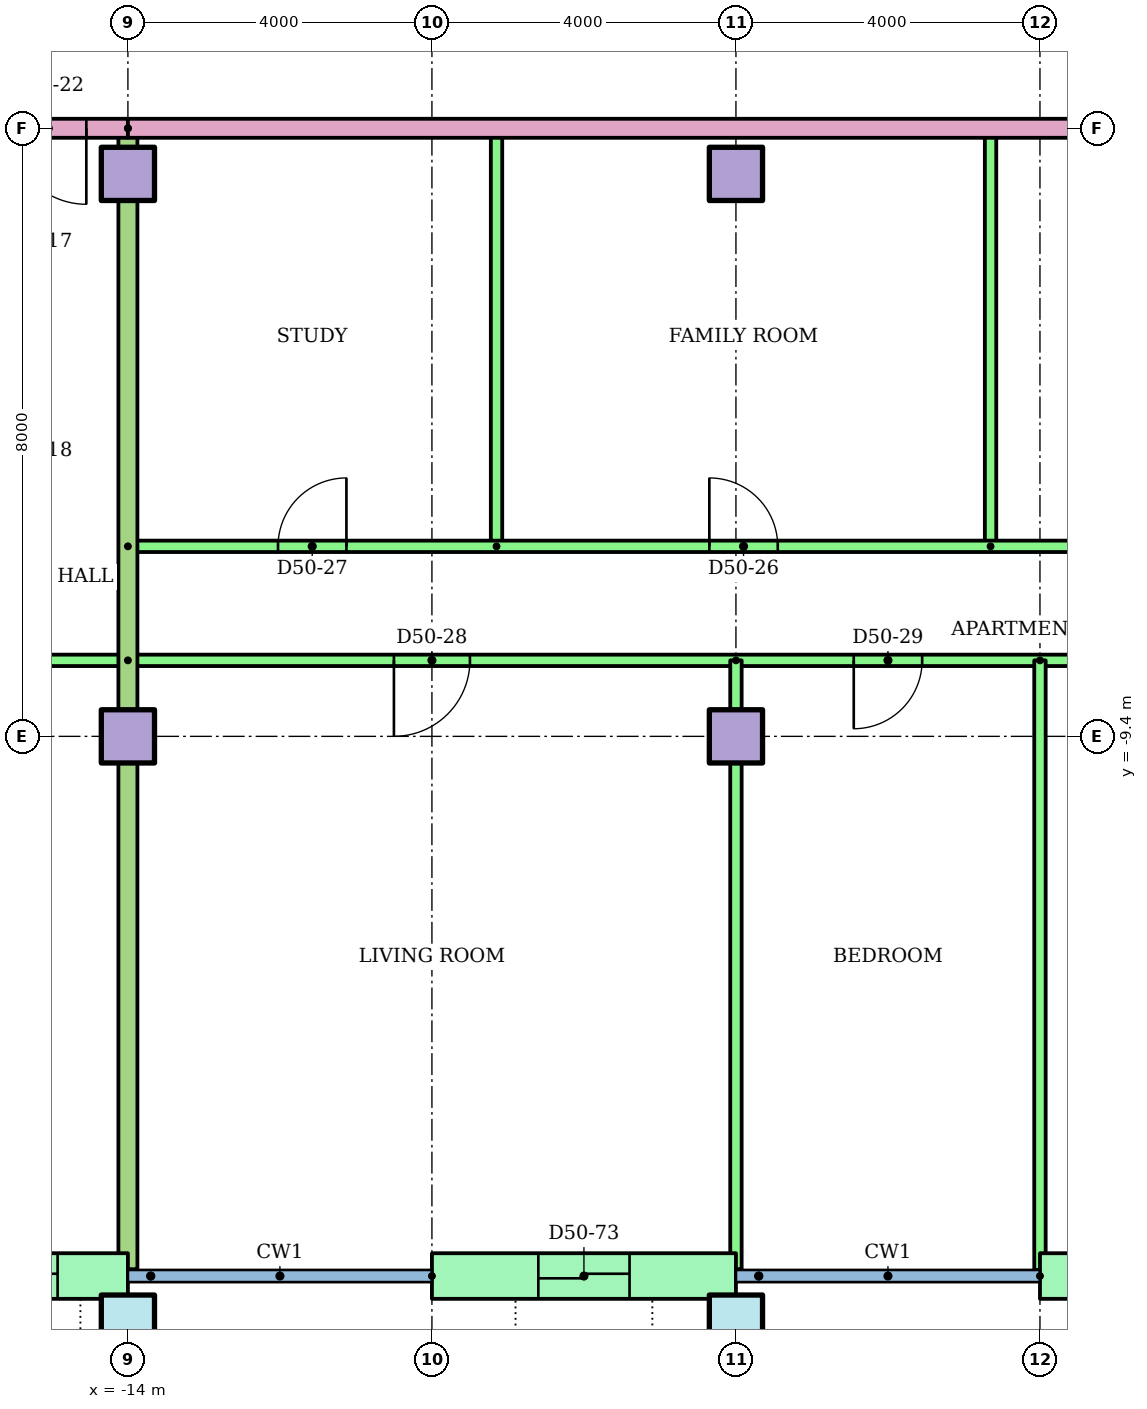
"""IFC4 building model, lengths in metres.
Left out: names, types, materials, properties, quantities, classifications, styles, units other than length and angle.
Written with IfcOpenShell. Run it as: python <this file> out.ifc"""

import sys

from ifc_helpers import new_model, si_unit, direction, frame, frame_2d, origin, origin_2d, place, context, subcontext, project, spatial, rectangle, hollow_rectangle, extrude, element, fill, save


model = new_model("IFC4")
c1 = context("Model", 3, precision=1e-05, world=origin(), true_north=direction((0.0, 1.0)))
c2 = subcontext(c1, "Body", "Model", "MODEL_VIEW")
j1 = project(units=[si_unit("LENGTHUNIT", "METRE"), si_unit("PLANEANGLEUNIT", "RADIAN")], contexts=[c1])
p1 = place(None, origin())
s1 = spatial("IfcSite", under=j1, at=p1, CompositionType="ELEMENT")
p2 = place(p1, origin())
s2 = spatial("IfcBuilding", under=s1, at=p2, CompositionType="ELEMENT")
p3 = place(p2, frame((0.0, 0.0, 190.9)))
s3 = spatial("IfcBuildingStorey", under=s2, at=p3, CompositionType="ELEMENT", Elevation=190.9)
for number, where in (
    (1, (-14.0, -17.1, 0.0)),
    (2, (-6.0, -17.1, 0.0)),
):
    element("IfcColumn", number, at=place(p3, frame(where)), inside=s3, PredefinedType="COLUMN", context=c2, shape_type="SweptSolid", body=[
        extrude(hollow_rectangle(XDim=0.7, YDim=0.7, WallThickness=0.036, at=origin_2d()), origin(), (0.0, 0.0, 1.0), 3.2),
    ])
for number, where in (
    (3, (-14.0, -9.4, 0.0)),
    (4, (-6.0, -9.4, 0.0)),
    (5, (-14.0, -2.0, 0.0)),
    (6, (-6.0, -2.0, 0.0)),
):
    element("IfcColumn", number, at=place(p3, frame(where)), inside=s3, PredefinedType="COLUMN", context=c2, shape_type="SweptSolid", body=[
        extrude(rectangle(XDim=0.7, YDim=0.7, at=origin_2d()), origin(), (0.0, 0.0, 1.0), 3.2),
    ])
p4 = place(p3, frame((-17.05, -16.5, 0.0)))
e7 = element("IfcWall", 7, at=p4, inside=s3, PredefinedType="STANDARD", context=c2, shape_type="SweptSolid", body=[
    extrude(rectangle(XDim=3.05, YDim=0.6, at=frame_2d((1.525, 0.0))), origin(), (0.0, 0.0, 1.0), 2.8),
])
p5 = place(p4, frame((0.925, 0.0, 0.0)))
e8 = element("IfcOpeningElement", 8, at=p5, cuts=e7, PredefinedType="OPENING", context=c2, shape_type="SweptSolid", body=[
    extrude(rectangle(XDim=1.2, YDim=2.1, at=frame_2d((0.6, 1.05))), frame((0.0, 0.31, 0.0), z_axis=(0.0, -1.0, 0.0), x_axis=(1.0, 0.0, 0.0)), (0.0, 0.0, 1.0), 0.62),
])
p6 = place(p3, frame((-10.0, -16.5, 0.0)))
e9 = element("IfcWall", 9, at=p6, inside=s3, PredefinedType="STANDARD", context=c2, shape_type="SweptSolid", body=[
    extrude(rectangle(XDim=4.0, YDim=0.6, at=frame_2d((2.0, 0.0))), origin(), (0.0, 0.0, 1.0), 2.8),
])
p7 = place(p6, frame((1.4, 0.0, 0.0)))
e10 = element("IfcOpeningElement", 10, at=p7, cuts=e9, PredefinedType="OPENING", context=c2, shape_type="SweptSolid", body=[
    extrude(rectangle(XDim=1.2, YDim=2.1, at=frame_2d((0.6, 1.05))), frame((0.0, 0.31, 0.0), z_axis=(0.0, -1.0, 0.0), x_axis=(1.0, 0.0, 0.0)), (0.0, 0.0, 1.0), 0.62),
])
p8 = place(p3, frame((-2.0, -16.5, 0.0)))
e11 = element("IfcWall", 11, at=p8, inside=s3, PredefinedType="STANDARD", context=c2, shape_type="SweptSolid", body=[
    extrude(rectangle(XDim=4.0, YDim=0.6, at=frame_2d((2.0, 0.0))), origin(), (0.0, 0.0, 1.0), 2.8),
])
p9 = place(p8, frame((1.4, 0.0, 0.0)))
e12 = element("IfcOpeningElement", 12, at=p9, cuts=e11, PredefinedType="OPENING", context=c2, shape_type="SweptSolid", body=[
    extrude(rectangle(XDim=1.2, YDim=2.1, at=frame_2d((0.6, 1.05))), frame((0.0, 0.31, 0.0), z_axis=(0.0, -1.0, 0.0), x_axis=(1.0, 0.0, 0.0)), (0.0, 0.0, 1.0), 0.62),
])
p10 = place(p3, frame((-14.0, -8.4, 0.0), z_axis=(0.0, 0.0, 1.0), x_axis=(-1.0, 0.0, 0.0)))
e13 = element("IfcWall", 13, at=p10, inside=s3, PredefinedType="PARTITIONING", context=c2, shape_type="SweptSolid", body=[
    extrude(rectangle(XDim=10.81, YDim=0.15, at=frame_2d((5.405, 0.0))), origin(), (0.0, 0.0, 1.0), 2.4),
])
p11 = place(p10, frame((8.547, 0.0, 0.0)))
e14 = element("IfcOpeningElement", 14, at=p11, cuts=e13, PredefinedType="OPENING", context=c2, shape_type="SweptSolid", body=[
    extrude(rectangle(XDim=0.9, YDim=2.1, at=frame_2d((0.45, 1.05))), frame((0.0, 0.085, 0.0), z_axis=(0.0, -1.0, 0.0), x_axis=(1.0, 0.0, 0.0)), (0.0, 0.0, 1.0), 0.17),
])
p12 = place(p10, frame((2.55, 0.0, 0.0)))
e15 = element("IfcOpeningElement", 15, at=p12, cuts=e13, PredefinedType="OPENING", context=c2, shape_type="SweptSolid", body=[
    extrude(rectangle(XDim=1.0, YDim=2.1, at=frame_2d((0.5, 1.05))), frame((0.0, 0.085, 0.0), z_axis=(0.0, -1.0, 0.0), x_axis=(1.0, 0.0, 0.0)), (0.0, 0.0, 1.0), 0.17),
])
for number, where, z_axis, x_axis in (
    (16, (-2.65, -6.9, 0.0), (0.0, 0.0, 1.0), (0.0, 1.0, 0.0)),
    (17, (-9.15, -6.9, 0.0), (0.0, 0.0, 1.0), (0.0, 1.0, 0.0)),
):
    element("IfcWall", number, at=place(p3, frame(where, z_axis=z_axis, x_axis=x_axis)), inside=s3, PredefinedType="PARTITIONING", context=c2, shape_type="SweptSolid", body=[
        extrude(rectangle(XDim=5.5, YDim=0.15, at=frame_2d((2.75, 0.0))), origin(), (0.0, 0.0, 1.0), 2.4),
    ])
p13 = place(p3, frame((-14.0, -6.9, 0.0)))
e18 = element("IfcWall", 18, at=p13, inside=s3, PredefinedType="PARTITIONING", context=c2, shape_type="SweptSolid", body=[
    extrude(rectangle(XDim=22.0, YDim=0.15, at=frame_2d((11.0, 0.0))), origin(), (0.0, 0.0, 1.0), 2.4),
])
p14 = place(p13, frame((15.025, 0.0, 0.0)))
e19 = element("IfcOpeningElement", 19, at=p14, cuts=e18, PredefinedType="OPENING", context=c2, shape_type="SweptSolid", body=[
    extrude(rectangle(XDim=0.9, YDim=2.1, at=frame_2d((0.45, 1.05))), frame((0.0, 0.085, 0.0), z_axis=(0.0, -1.0, 0.0), x_axis=(1.0, 0.0, 0.0)), (0.0, 0.0, 1.0), 0.17),
])
p15 = place(p13, frame((7.65, 0.0, 0.0)))
e20 = element("IfcOpeningElement", 20, at=p15, cuts=e18, PredefinedType="OPENING", context=c2, shape_type="SweptSolid", body=[
    extrude(rectangle(XDim=0.9, YDim=2.1, at=frame_2d((0.45, 1.05))), frame((0.0, 0.085, 0.0), z_axis=(0.0, -1.0, 0.0), x_axis=(1.0, 0.0, 0.0)), (0.0, 0.0, 1.0), 0.17),
])
p16 = place(p13, frame((1.975, 0.0, 0.0)))
e21 = element("IfcOpeningElement", 21, at=p16, cuts=e18, PredefinedType="OPENING", context=c2, shape_type="SweptSolid", body=[
    extrude(rectangle(XDim=0.9, YDim=2.1, at=frame_2d((0.45, 1.05))), frame((0.0, 0.085, 0.0), z_axis=(0.0, -1.0, 0.0), x_axis=(1.0, 0.0, 0.0)), (0.0, 0.0, 1.0), 0.17),
])
p17 = place(p3, frame((10.0, -8.4, 0.0), z_axis=(0.0, 0.0, 1.0), x_axis=(-1.0, 0.0, 0.0)))
e22 = element("IfcWall", 22, at=p17, inside=s3, PredefinedType="PARTITIONING", context=c2, shape_type="SweptSolid", body=[
    extrude(rectangle(XDim=24.0, YDim=0.15, at=frame_2d((12.0, 0.0))), origin(), (0.0, 0.0, 1.0), 2.4),
])
p18 = place(p17, frame((19.5, 0.0, 0.0)))
e23 = element("IfcOpeningElement", 23, at=p18, cuts=e22, PredefinedType="OPENING", context=c2, shape_type="SweptSolid", body=[
    extrude(rectangle(XDim=1.0, YDim=2.1, at=frame_2d((0.5, 1.05))), frame((0.0, 0.085, 0.0), z_axis=(0.0, -1.0, 0.0), x_axis=(1.0, 0.0, 0.0)), (0.0, 0.0, 1.0), 0.17),
])
p19 = place(p17, frame((13.55, 0.0, 0.0)))
e24 = element("IfcOpeningElement", 24, at=p19, cuts=e22, PredefinedType="OPENING", context=c2, shape_type="SweptSolid", body=[
    extrude(rectangle(XDim=0.9, YDim=2.1, at=frame_2d((0.45, 1.05))), frame((0.0, 0.085, 0.0), z_axis=(0.0, -1.0, 0.0), x_axis=(1.0, 0.0, 0.0)), (0.0, 0.0, 1.0), 0.17),
])
p20 = place(p17, frame((9.55, 0.0, 0.0)))
e25 = element("IfcOpeningElement", 25, at=p20, cuts=e22, PredefinedType="OPENING", context=c2, shape_type="SweptSolid", body=[
    extrude(rectangle(XDim=0.9, YDim=2.1, at=frame_2d((0.45, 1.05))), frame((0.0, 0.085, 0.0), z_axis=(0.0, -1.0, 0.0), x_axis=(1.0, 0.0, 0.0)), (0.0, 0.0, 1.0), 0.17),
])
p21 = place(p17, frame((5.55, 0.0, 0.0)))
e26 = element("IfcOpeningElement", 26, at=p21, cuts=e22, PredefinedType="OPENING", context=c2, shape_type="SweptSolid", body=[
    extrude(rectangle(XDim=0.9, YDim=2.1, at=frame_2d((0.45, 1.05))), frame((0.0, 0.085, 0.0), z_axis=(0.0, -1.0, 0.0), x_axis=(1.0, 0.0, 0.0)), (0.0, 0.0, 1.0), 0.17),
])
p22 = place(p17, frame((1.55, 0.0, 0.0)))
e27 = element("IfcOpeningElement", 27, at=p22, cuts=e22, PredefinedType="OPENING", context=c2, shape_type="SweptSolid", body=[
    extrude(rectangle(XDim=0.9, YDim=2.1, at=frame_2d((0.45, 1.05))), frame((0.0, 0.085, 0.0), z_axis=(0.0, -1.0, 0.0), x_axis=(1.0, 0.0, 0.0)), (0.0, 0.0, 1.0), 0.17),
])
p23 = place(p3, frame((-6.0, -8.4, 0.0), z_axis=(0.0, 0.0, 1.0), x_axis=(0.0, -1.0, 0.0)))
e28 = element("IfcWall", 28, at=p23, inside=s3, PredefinedType="PARTITIONING", context=c2, shape_type="SweptSolid", body=[
    extrude(rectangle(XDim=8.01, YDim=0.15, at=frame_2d((4.005, 0.0))), origin(), (0.0, 0.0, 1.0), 2.4),
])
p24 = place(p3, frame((-2.0, -8.4, 0.0), z_axis=(0.0, 0.0, 1.0), x_axis=(0.0, -1.0, 0.0)))
e29 = element("IfcWall", 29, at=p24, inside=s3, PredefinedType="PARTITIONING", context=c2, shape_type="SweptSolid", body=[
    extrude(rectangle(XDim=8.021, YDim=0.15, at=frame_2d((4.01, 0.0))), origin(), (0.0, 0.0, 1.0), 2.4),
])
p25 = place(p3, frame((-14.0, -1.4, 0.0), z_axis=(0.0, 0.0, 1.0), x_axis=(0.0, -1.0, 0.0)))
e30 = element("IfcWall", 30, at=p25, inside=s3, PredefinedType="PARTITIONING", context=c2, shape_type="SweptSolid", body=[
    extrude(rectangle(XDim=15.01, YDim=0.25, at=frame_2d((7.505, 0.0))), origin(), (0.0, 0.0, 1.0), 2.4),
])
p26 = place(p3, frame((-14.0, -1.4, 0.0), z_axis=(0.0, 0.0, 1.0), x_axis=(-1.0, 0.0, 0.0)))
e31 = element("IfcWall", 31, at=p26, inside=s3, PredefinedType="PARTITIONING", context=c2, shape_type="SweptSolid", body=[
    extrude(rectangle(XDim=10.82, YDim=0.25, at=frame_2d((5.41, 0.0))), origin(), (0.0, 0.0, 1.0), 2.4),
])
p27 = place(p26, frame((0.547, 0.0, 0.0)))
e32 = element("IfcOpeningElement", 32, at=p27, cuts=e31, PredefinedType="OPENING", context=c2, shape_type="SweptSolid", body=[
    extrude(rectangle(XDim=1.0, YDim=2.1, at=frame_2d((0.5, 1.05))), frame((0.0, 0.135, 0.0), z_axis=(0.0, -1.0, 0.0), x_axis=(1.0, 0.0, 0.0)), (0.0, 0.0, 1.0), 0.27),
])
p28 = place(p3, frame((14.0, -1.4, 0.0), z_axis=(0.0, 0.0, 1.0), x_axis=(-1.0, 0.0, 0.0)))
e33 = element("IfcWall", 33, at=p28, inside=s3, PredefinedType="PARTITIONING", context=c2, shape_type="SweptSolid", body=[
    extrude(rectangle(XDim=28.0, YDim=0.25, at=frame_2d((14.0, 0.0))), origin(), (0.0, 0.0, 1.0), 2.4),
])
p29 = place(p28, frame((4.547, 0.0, 0.0)))
e34 = element("IfcOpeningElement", 34, at=p29, cuts=e33, PredefinedType="OPENING", context=c2, shape_type="SweptSolid", body=[
    extrude(rectangle(XDim=1.0, YDim=2.1, at=frame_2d((0.5, 1.05))), frame((0.0, 0.135, 0.0), z_axis=(0.0, -1.0, 0.0), x_axis=(1.0, 0.0, 0.0)), (0.0, 0.0, 1.0), 0.27),
])
p30 = place(p28, frame((2.453, 0.0, 0.0)))
e35 = element("IfcOpeningElement", 35, at=p30, cuts=e33, PredefinedType="OPENING", context=c2, shape_type="SweptSolid", body=[
    extrude(rectangle(XDim=1.0, YDim=2.1, at=frame_2d((0.5, 1.05))), frame((0.0, 0.135, 0.0), z_axis=(0.0, -1.0, 0.0), x_axis=(1.0, 0.0, 0.0)), (0.0, 0.0, 1.0), 0.27),
])
p31 = place(p27, origin())
e36 = element("IfcDoor", 36, at=p31, inside=s3, OperationType="SINGLE_SWING_LEFT", PredefinedType="DOOR", context=c2, shape_type="SweptSolid", body=[
    extrude(rectangle(XDim=1.0, YDim=2.1, at=frame_2d((0.5, 1.05))), frame((0.0, 0.025, 0.0), z_axis=(0.0, -1.0, 0.0), x_axis=(1.0, 0.0, 0.0)), (0.0, 0.0, 1.0), 0.05),
])
fill(e32, e36)
p32 = place(p15, origin())
e37 = element("IfcDoor", 37, at=p32, inside=s3, OperationType="SINGLE_SWING_LEFT", PredefinedType="DOOR", context=c2, shape_type="SweptSolid", body=[
    extrude(rectangle(XDim=0.9, YDim=2.1, at=frame_2d((0.45, 1.05))), frame((0.0, 0.025, 0.0), z_axis=(0.0, -1.0, 0.0), x_axis=(1.0, 0.0, 0.0)), (0.0, 0.0, 1.0), 0.05),
])
fill(e20, e37)
p33 = place(p16, origin())
e38 = element("IfcDoor", 38, at=p33, inside=s3, OperationType="SINGLE_SWING_RIGHT", PredefinedType="DOOR", context=c2, shape_type="SweptSolid", body=[
    extrude(rectangle(XDim=0.9, YDim=2.1, at=frame_2d((0.45, 1.05))), frame((0.0, 0.025, 0.0), z_axis=(0.0, -1.0, 0.0), x_axis=(1.0, 0.0, 0.0)), (0.0, 0.0, 1.0), 0.05),
])
fill(e21, e38)
p34 = place(p18, origin())
e39 = element("IfcDoor", 39, at=p34, inside=s3, OperationType="SINGLE_SWING_RIGHT", PredefinedType="DOOR", context=c2, shape_type="SweptSolid", body=[
    extrude(rectangle(XDim=1.0, YDim=2.1, at=frame_2d((0.5, 1.05))), frame((0.0, 0.025, 0.0), z_axis=(0.0, -1.0, 0.0), x_axis=(1.0, 0.0, 0.0)), (0.0, 0.0, 1.0), 0.05),
])
fill(e23, e39)
p35 = place(p19, origin())
e40 = element("IfcDoor", 40, at=p35, inside=s3, OperationType="SINGLE_SWING_RIGHT", PredefinedType="DOOR", context=c2, shape_type="SweptSolid", body=[
    extrude(rectangle(XDim=0.9, YDim=2.1, at=frame_2d((0.45, 1.05))), frame((0.0, 0.025, 0.0), z_axis=(0.0, -1.0, 0.0), x_axis=(1.0, 0.0, 0.0)), (0.0, 0.0, 1.0), 0.05),
])
fill(e24, e40)
p36 = place(p5, origin())
e41 = element("IfcDoor", 41, at=p36, inside=s3, OperationType="SLIDING_TO_LEFT", PredefinedType="DOOR", context=c2, shape_type="SweptSolid", body=[
    extrude(rectangle(XDim=1.2, YDim=2.1, at=frame_2d((0.6, 1.05))), frame((0.0, 0.025, 0.0), z_axis=(0.0, -1.0, 0.0), x_axis=(1.0, 0.0, 0.0)), (0.0, 0.0, 1.0), 0.05),
])
fill(e8, e41)
p37 = place(p7, origin())
e42 = element("IfcDoor", 42, at=p37, inside=s3, OperationType="SLIDING_TO_LEFT", PredefinedType="DOOR", context=c2, shape_type="SweptSolid", body=[
    extrude(rectangle(XDim=1.2, YDim=2.1, at=frame_2d((0.6, 1.05))), frame((0.0, 0.025, 0.0), z_axis=(0.0, -1.0, 0.0), x_axis=(1.0, 0.0, 0.0)), (0.0, 0.0, 1.0), 0.05),
])
fill(e10, e42)
save(model, sys.argv[1])
